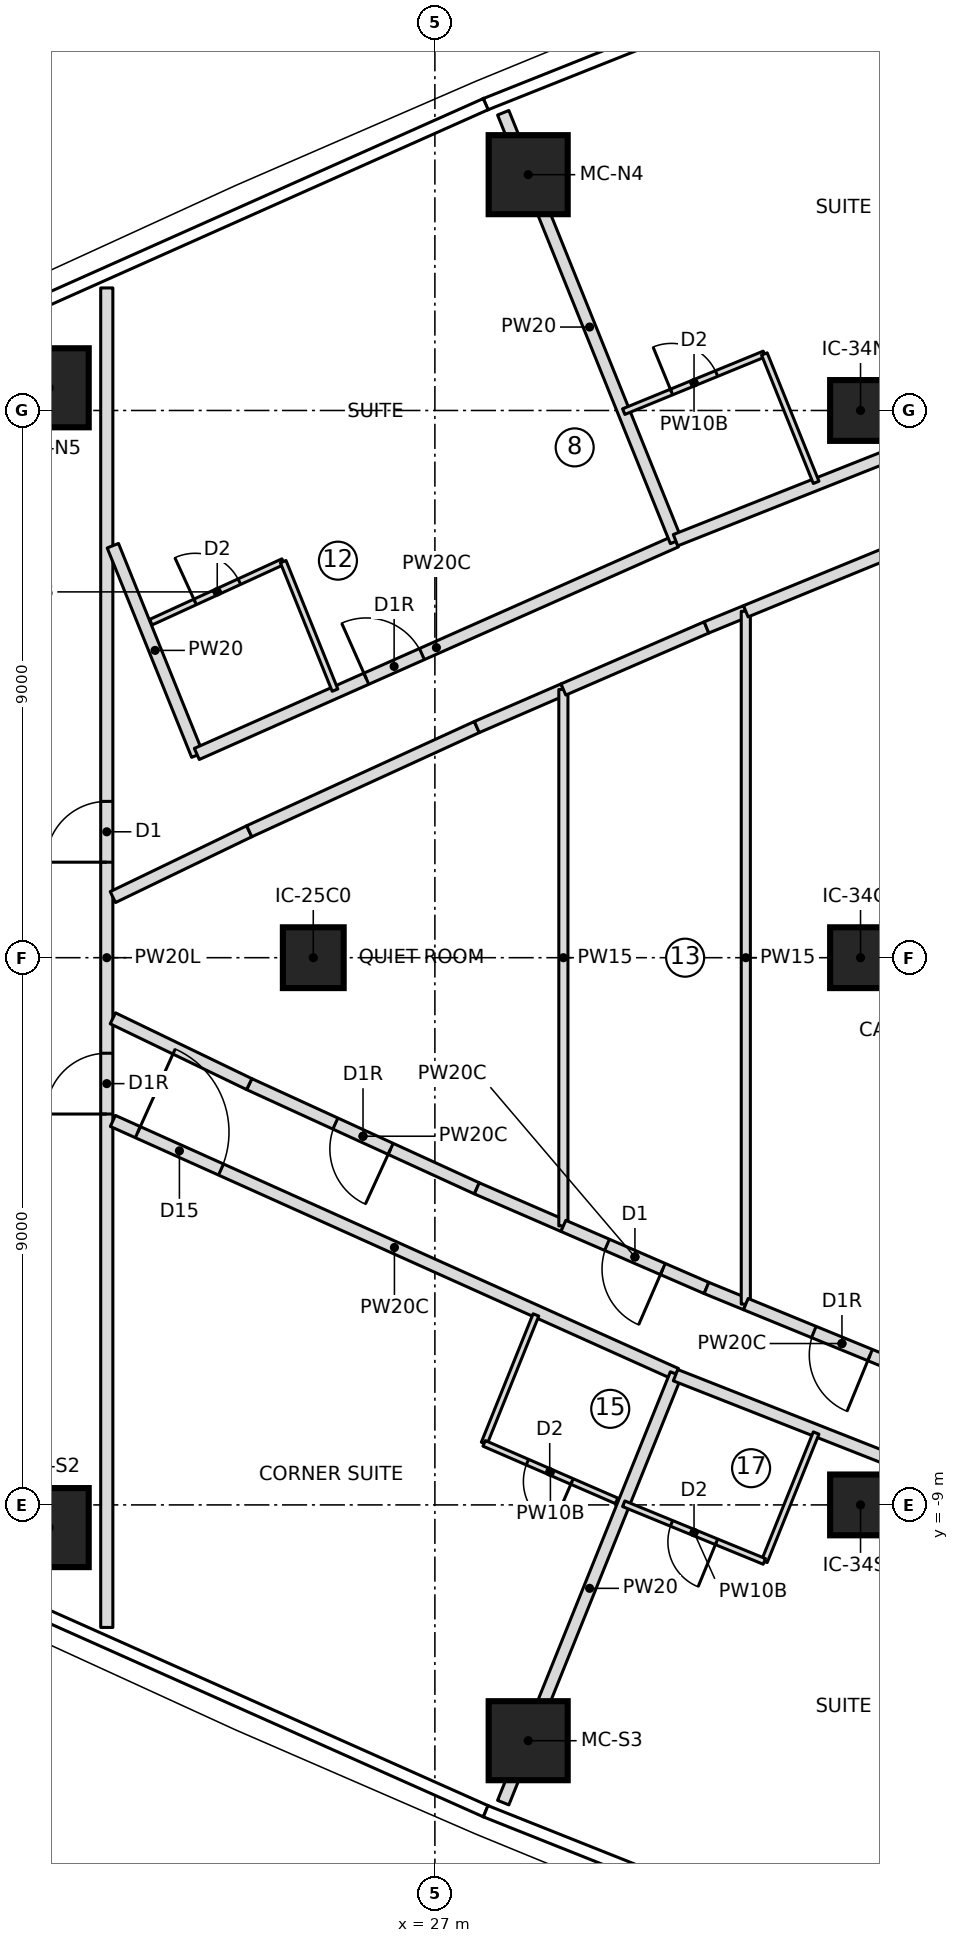
"""IFC4 building model, lengths in metres.
Left out: names, types, materials, properties, quantities, classifications, styles, units other than length and angle.
Written with IfcOpenShell. Run it as: python <this file> out.ifc"""

import sys

from ifc_helpers import new_model, si_unit, direction, frame, frame_2d, origin, origin_2d, place, context, subcontext, project, spatial, rectangle, extrude, element, fill, save


model = new_model("IFC4")
c1 = context("Model", 3, precision=1e-05, world=origin(), true_north=direction((0.0, 1.0)))
c2 = subcontext(c1, "Body", "Model", "MODEL_VIEW")
j1 = project(units=[si_unit("LENGTHUNIT", "METRE"), si_unit("PLANEANGLEUNIT", "RADIAN")], contexts=[c1])
p1 = place(None, origin())
s1 = spatial("IfcSite", under=j1, at=p1, CompositionType="ELEMENT")
p2 = place(p1, origin())
s2 = spatial("IfcBuilding", under=s1, at=p2, CompositionType="ELEMENT")
p3 = place(p2, frame((0.0, 0.0, 179.05)))
s3 = spatial("IfcBuildingStorey", under=s2, at=p3, CompositionType="ELEMENT", Elevation=179.05)
for number, where, z_axis, x_axis in (
    (1, (20.657, -9.373, 0.0), (0.0, 0.0, 1.0), (1.0, 0.0, 0.0)),
    (2, (28.534, -12.878, 0.0), (0.0, 0.0, 1.0), (1.0, 0.0, 0.0)),
    (3, (28.534, 12.878, 0.0), (0.0, 0.0, 1.0), (1.0, 0.0, 0.0)),
    (4, (20.657, 9.373, 0.0), (0.0, 0.0, 1.0), (1.0, 0.0, 0.0)),
):
    element("IfcColumn", number, at=place(p3, frame(where, z_axis=z_axis, x_axis=x_axis)), inside=s3, PredefinedType="COLUMN", context=c2, shape_type="SweptSolid", body=[
        extrude(rectangle(XDim=1.3, YDim=1.3, at=origin_2d()), origin(), (0.0, 0.0, 1.0), 3.55),
    ])
for number, where, z_axis, x_axis in (
    (5, (25.0, 0.0, 0.0), (0.0, 0.0, 1.0), (1.0, 0.0, 0.0)),
    (6, (34.0, -9.0, 0.0), (0.0, 0.0, 1.0), (1.0, 0.0, 0.0)),
    (7, (34.0, 0.0, 0.0), (0.0, 0.0, 1.0), (1.0, 0.0, 0.0)),
    (8, (34.0, 9.0, 0.0), (0.0, 0.0, 1.0), (1.0, 0.0, 0.0)),
):
    element("IfcColumn", number, at=place(p3, frame(where, z_axis=z_axis, x_axis=x_axis)), inside=s3, PredefinedType="COLUMN", context=c2, shape_type="SweptSolid", body=[
        extrude(rectangle(XDim=1.0, YDim=1.0, at=origin_2d()), origin(), (0.0, 0.0, 1.0), 3.55),
    ])
p4 = place(p3, frame((21.604, -11.015, 0.0), z_axis=(0.0, 0.0, 1.0), x_axis=(0.0, 1.0, 0.0)))
e9 = element("IfcWall", 9, at=p4, inside=s3, PredefinedType="PARTITIONING", context=c2, shape_type="SweptSolid", body=[
    extrude(rectangle(XDim=22.031, YDim=0.2, at=frame_2d((11.015, 0.0))), origin(), (0.0, 0.0, 1.0), 3.25),
])
p5 = place(p4, frame((12.586, 0.0, 0.0)))
e10 = element("IfcOpeningElement", 10, at=p5, cuts=e9, PredefinedType="OPENING", context=c2, shape_type="SweptSolid", body=[
    extrude(rectangle(XDim=1.0, YDim=2.1, at=frame_2d((0.5, 1.05))), frame((0.0, 0.11, 0.0), z_axis=(0.0, -1.0, 0.0), x_axis=(1.0, 0.0, 0.0)), (0.0, 0.0, 1.0), 0.22),
])
p6 = place(p4, frame((8.444, 0.0, 0.0)))
e11 = element("IfcOpeningElement", 11, at=p6, cuts=e9, PredefinedType="OPENING", context=c2, shape_type="SweptSolid", body=[
    extrude(rectangle(XDim=1.0, YDim=2.1, at=frame_2d((0.5, 1.05))), frame((0.0, 0.11, 0.0), z_axis=(0.0, -1.0, 0.0), x_axis=(1.0, 0.0, 0.0)), (0.0, 0.0, 1.0), 0.22),
])
p7 = place(p3, frame((23.092, 3.333, 0.0), z_axis=(0.0, 0.0, 1.0), x_axis=(-0.373883495288, 0.927475677283, 0.0)))
e12 = element("IfcWall", 12, at=p7, inside=s3, PredefinedType="PARTITIONING", context=c2, shape_type="SweptSolid", body=[
    extrude(rectangle(XDim=3.713, YDim=0.2, at=frame_2d((1.856, 0.0))), origin(), (0.0, 0.0, 1.0), 3.25),
])
p8 = place(p3, frame((23.085, 3.351, 0.0), z_axis=(0.0, 0.0, 1.0), x_axis=(0.914065936171, 0.405565610392, 0.0)))
e13 = element("IfcWall", 13, at=p8, inside=s3, PredefinedType="PARTITIONING", context=c2, shape_type="SweptSolid", body=[
    extrude(rectangle(XDim=8.622, YDim=0.2, at=frame_2d((4.311, 0.0))), origin(), (0.0, 0.0, 1.0), 3.25),
])
p9 = place(p8, frame((3.05, 0.0, 0.0)))
e14 = element("IfcOpeningElement", 14, at=p9, cuts=e13, PredefinedType="OPENING", context=c2, shape_type="SweptSolid", body=[
    extrude(rectangle(XDim=1.0, YDim=2.1, at=frame_2d((0.5, 1.05))), frame((0.0, 0.11, 0.0), z_axis=(0.0, -1.0, 0.0), x_axis=(1.0, 0.0, 0.0)), (0.0, 0.0, 1.0), 0.22),
])
p10 = place(p3, frame((22.33, 5.518, 0.0), z_axis=(0.0, 0.0, 1.0), x_axis=(0.909209708064, 0.416338452178, 0.0)))
e15 = element("IfcWall", 15, at=p10, inside=s3, PredefinedType="PARTITIONING", context=c2, shape_type="SweptSolid", body=[
    extrude(rectangle(XDim=2.393, YDim=0.1, at=frame_2d((1.196, 0.0))), origin(), (0.0, 0.0, 1.0), 3.25),
])
p11 = place(p10, frame((0.8, 0.0, 0.0)))
e16 = element("IfcOpeningElement", 16, at=p11, cuts=e15, PredefinedType="OPENING", context=c2, shape_type="SweptSolid", body=[
    extrude(rectangle(XDim=0.8, YDim=2.1, at=frame_2d((0.4, 1.05))), frame((0.0, 0.06, 0.0), z_axis=(0.0, -1.0, 0.0), x_axis=(1.0, 0.0, 0.0)), (0.0, 0.0, 1.0), 0.12),
])
p12 = place(p3, frame((24.505, 6.514, 0.0), z_axis=(0.0, 0.0, 1.0), x_axis=(0.373919298041, -0.927461243693, 0.0)))
e17 = element("IfcWall", 17, at=p12, inside=s3, PredefinedType="PARTITIONING", context=c2, shape_type="SweptSolid", body=[
    extrude(rectangle(XDim=2.279, YDim=0.1, at=frame_2d((1.14, 0.0))), origin(), (0.0, 0.0, 1.0), 3.25),
])
p13 = place(p3, frame((30.965, 6.848, 0.0), z_axis=(0.0, 0.0, 1.0), x_axis=(-0.373876084216, 0.927478664796, 0.0)))
e18 = element("IfcWall", 18, at=p13, inside=s3, PredefinedType="PARTITIONING", context=c2, shape_type="SweptSolid", body=[
    extrude(rectangle(XDim=7.6, YDim=0.2, at=frame_2d((3.8, 0.0))), origin(), (0.0, 0.0, 1.0), 3.25),
])
p14 = place(p3, frame((38.972, 10.045, 0.0), z_axis=(0.0, 0.0, 1.0), x_axis=(-0.929554647243, -0.368684360651, 0.0)))
e19 = element("IfcWall", 19, at=p14, inside=s3, PredefinedType="PARTITIONING", context=c2, shape_type="SweptSolid", body=[
    extrude(rectangle(XDim=8.622, YDim=0.2, at=frame_2d((4.311, 0.0))), origin(), (0.0, 0.0, 1.0), 3.25),
])
p15 = place(p14, frame((0.35, 0.0, 0.0)))
e20 = element("IfcOpeningElement", 20, at=p15, cuts=e19, PredefinedType="OPENING", context=c2, shape_type="SweptSolid", body=[
    extrude(rectangle(XDim=1.0, YDim=2.1, at=frame_2d((0.5, 1.05))), frame((0.0, 0.11, 0.0), z_axis=(0.0, -1.0, 0.0), x_axis=(1.0, 0.0, 0.0)), (0.0, 0.0, 1.0), 0.22),
])
p16 = place(p3, frame((30.105, 8.981, 0.0), z_axis=(0.0, 0.0, 1.0), x_axis=(0.92519499486, 0.379492057212, 0.0)))
e21 = element("IfcWall", 21, at=p16, inside=s3, PredefinedType="PARTITIONING", context=c2, shape_type="SweptSolid", body=[
    extrude(rectangle(XDim=2.5, YDim=0.1, at=frame_2d((1.25, 0.0))), origin(), (0.0, 0.0, 1.0), 3.25),
])
p17 = place(p16, frame((0.85, 0.0, 0.0)))
e22 = element("IfcOpeningElement", 22, at=p17, cuts=e21, PredefinedType="OPENING", context=c2, shape_type="SweptSolid", body=[
    extrude(rectangle(XDim=0.8, YDim=2.1, at=frame_2d((0.4, 1.05))), frame((0.0, 0.06, 0.0), z_axis=(0.0, -1.0, 0.0), x_axis=(1.0, 0.0, 0.0)), (0.0, 0.0, 1.0), 0.12),
])
p18 = place(p3, frame((32.418, 9.93, 0.0), z_axis=(0.0, 0.0, 1.0), x_axis=(0.373847853912, -0.927490044219, 0.0)))
e23 = element("IfcWall", 23, at=p18, inside=s3, PredefinedType="PARTITIONING", context=c2, shape_type="SweptSolid", body=[
    extrude(rectangle(XDim=2.277, YDim=0.1, at=frame_2d((1.139, 0.0))), origin(), (0.0, 0.0, 1.0), 3.25),
])
p19 = place(p3, frame((21.704, -2.685, 0.0), z_axis=(0.0, 0.0, 1.0), x_axis=(0.912095082087, -0.409978732659, 0.0)))
e24 = element("IfcWall", 24, at=p19, inside=s3, PredefinedType="PARTITIONING", context=c2, shape_type="SweptSolid", body=[
    extrude(rectangle(XDim=10.154, YDim=0.2, at=frame_2d((5.077, 0.0))), origin(), (0.0, 0.0, 1.0), 3.25),
])
p20 = place(p19, frame((0.45, 0.0, 0.0)))
e25 = element("IfcOpeningElement", 25, at=p20, cuts=e24, PredefinedType="OPENING", context=c2, shape_type="SweptSolid", body=[
    extrude(rectangle(XDim=1.5, YDim=2.1, at=frame_2d((0.75, 1.05))), frame((0.0, 0.11, 0.0), z_axis=(0.0, -1.0, 0.0), x_axis=(1.0, 0.0, 0.0)), (0.0, 0.0, 1.0), 0.22),
])
p21 = place(p3, frame((27.81, -7.988, 0.0), z_axis=(0.0, 0.0, 1.0), x_axis=(0.373865727953, 0.927482839443, 0.0)))
e26 = element("IfcWall", 26, at=p21, inside=s3, PredefinedType="PARTITIONING", context=c2, shape_type="SweptSolid", body=[
    extrude(rectangle(XDim=2.278, YDim=0.1, at=frame_2d((1.139, 0.0))), origin(), (0.0, 0.0, 1.0), 3.25),
])
p22 = place(p3, frame((29.989, -8.933, 0.0), z_axis=(0.0, 0.0, 1.0), x_axis=(-0.917386792713, 0.397996824805, 0.0)))
e27 = element("IfcWall", 27, at=p22, inside=s3, PredefinedType="PARTITIONING", context=c2, shape_type="SweptSolid", body=[
    extrude(rectangle(XDim=2.375, YDim=0.1, at=frame_2d((1.188, 0.0))), origin(), (0.0, 0.0, 1.0), 3.25),
])
p23 = place(p22, frame((0.8, 0.0, 0.0)))
e28 = element("IfcOpeningElement", 28, at=p23, cuts=e27, PredefinedType="OPENING", context=c2, shape_type="SweptSolid", body=[
    extrude(rectangle(XDim=0.8, YDim=2.1, at=frame_2d((0.4, 1.05))), frame((0.0, 0.06, 0.0), z_axis=(0.0, -1.0, 0.0), x_axis=(1.0, 0.0, 0.0)), (0.0, 0.0, 1.0), 0.12),
])
p24 = place(p3, frame((28.124, -13.897, 0.0), z_axis=(0.0, 0.0, 1.0), x_axis=(0.373876084216, 0.927478664796, 0.0)))
e29 = element("IfcWall", 29, at=p24, inside=s3, PredefinedType="PARTITIONING", context=c2, shape_type="SweptSolid", body=[
    extrude(rectangle(XDim=7.6, YDim=0.2, at=frame_2d((3.8, 0.0))), origin(), (0.0, 0.0, 1.0), 3.25),
])
p25 = place(p3, frame((30.958, -6.866, 0.0), z_axis=(0.0, 0.0, 1.0), x_axis=(0.93040517394, -0.366532689274, 0.0)))
e30 = element("IfcWall", 30, at=p25, inside=s3, PredefinedType="PARTITIONING", context=c2, shape_type="SweptSolid", body=[
    extrude(rectangle(XDim=8.622, YDim=0.2, at=frame_2d((4.311, 0.0))), origin(), (0.0, 0.0, 1.0), 3.25),
])
p26 = place(p25, frame((4.25, 0.0, 0.0)))
e31 = element("IfcOpeningElement", 31, at=p26, cuts=e30, PredefinedType="OPENING", context=c2, shape_type="SweptSolid", body=[
    extrude(rectangle(XDim=1.0, YDim=2.1, at=frame_2d((0.5, 1.05))), frame((0.0, 0.11, 0.0), z_axis=(0.0, -1.0, 0.0), x_axis=(1.0, 0.0, 0.0)), (0.0, 0.0, 1.0), 0.22),
])
p27 = place(p3, frame((33.27, -7.818, 0.0), z_axis=(0.0, 0.0, 1.0), x_axis=(-0.373847853912, -0.927490044219, 0.0)))
e32 = element("IfcWall", 32, at=p27, inside=s3, PredefinedType="PARTITIONING", context=c2, shape_type="SweptSolid", body=[
    extrude(rectangle(XDim=2.277, YDim=0.1, at=frame_2d((1.139, 0.0))), origin(), (0.0, 0.0, 1.0), 3.25),
])
p28 = place(p3, frame((32.418, -9.93, 0.0), z_axis=(0.0, 0.0, 1.0), x_axis=(-0.92519499486, 0.379492057212, 0.0)))
e33 = element("IfcWall", 33, at=p28, inside=s3, PredefinedType="PARTITIONING", context=c2, shape_type="SweptSolid", body=[
    extrude(rectangle(XDim=2.5, YDim=0.1, at=frame_2d((1.25, 0.0))), origin(), (0.0, 0.0, 1.0), 3.25),
])
p29 = place(p28, frame((0.85, 0.0, 0.0)))
e34 = element("IfcOpeningElement", 34, at=p29, cuts=e33, PredefinedType="OPENING", context=c2, shape_type="SweptSolid", body=[
    extrude(rectangle(XDim=0.8, YDim=2.1, at=frame_2d((0.4, 1.05))), frame((0.0, 0.06, 0.0), z_axis=(0.0, -1.0, 0.0), x_axis=(1.0, 0.0, 0.0)), (0.0, 0.0, 1.0), 0.12),
])
p30 = place(p3, frame((27.69, -3.793, 0.0), z_axis=(0.0, 0.0, 1.0), x_axis=(-0.909180834404, 0.416401501382, 0.0)))
e35 = element("IfcWall", 35, at=p30, inside=s3, PredefinedType="PARTITIONING", context=c2, shape_type="SweptSolid", body=[
    extrude(rectangle(XDim=4.117, YDim=0.2, at=frame_2d((2.059, 0.0))), origin(), (0.0, 0.0, 1.0), 3.25),
])
p31 = place(p30, frame((1.559, 0.0, 0.0)))
e36 = element("IfcOpeningElement", 36, at=p31, cuts=e35, PredefinedType="OPENING", context=c2, shape_type="SweptSolid", body=[
    extrude(rectangle(XDim=1.0, YDim=2.1, at=frame_2d((0.5, 1.05))), frame((0.0, 0.11, 0.0), z_axis=(0.0, -1.0, 0.0), x_axis=(1.0, 0.0, 0.0)), (0.0, 0.0, 1.0), 0.22),
])
for number, where, z_axis, x_axis in (
    (37, (23.947, -2.079, 0.0), (0.0, 0.0, 1.0), (-0.901, 0.435, 0.0)),
    (38, (21.704, 0.997, 0.0), (0.0, 0.0, 1.0), (0.901, 0.435, 0.0)),
):
    element("IfcWall", number, at=place(p3, frame(where, z_axis=z_axis, x_axis=x_axis)), inside=s3, PredefinedType="PARTITIONING", context=c2, shape_type="SweptSolid", body=[
        extrude(rectangle(XDim=2.49, YDim=0.2, at=frame_2d((1.245, 0.0))), origin(), (0.0, 0.0, 1.0), 3.25),
    ])
p32 = place(p3, frame((23.947, 2.079, 0.0), z_axis=(0.0, 0.0, 1.0), x_axis=(0.909180834404, 0.416401501382, 0.0)))
e39 = element("IfcWall", 39, at=p32, inside=s3, PredefinedType="PARTITIONING", context=c2, shape_type="SweptSolid", body=[
    extrude(rectangle(XDim=4.117, YDim=0.2, at=frame_2d((2.059, 0.0))), origin(), (0.0, 0.0, 1.0), 3.25),
])
for number, where, z_axis, x_axis in (
    (40, (27.69, 3.793, 0.0), (0.0, 0.0, 1.0), (0.917, 0.398, 0.0)),
    (41, (29.113, -4.411, 0.0), (0.0, 0.0, 1.0), (-0.917, 0.398, 0.0)),
):
    element("IfcWall", number, at=place(p3, frame(where, z_axis=z_axis, x_axis=x_axis)), inside=s3, PredefinedType="PARTITIONING", context=c2, shape_type="SweptSolid", body=[
        extrude(rectangle(XDim=1.552, YDim=0.2, at=frame_2d((0.776, 0.0))), origin(), (0.0, 0.0, 1.0), 3.25),
    ])
p33 = place(p3, frame((29.113, -4.411, 0.0), z_axis=(0.0, 0.0, 1.0), x_axis=(0.0, 1.0, 0.0)))
e42 = element("IfcWall", 42, at=p33, inside=s3, PredefinedType="PARTITIONING", context=c2, shape_type="SweptSolid", body=[
    extrude(rectangle(XDim=8.822, YDim=0.15, at=frame_2d((4.411, 0.0))), origin(), (0.0, 0.0, 1.0), 3.25),
])
p34 = place(p3, frame((31.467, -5.432, 0.0), z_axis=(0.0, 0.0, 1.0), x_axis=(-0.91737845263, 0.398016048231, 0.0)))
e43 = element("IfcWall", 43, at=p34, inside=s3, PredefinedType="PARTITIONING", context=c2, shape_type="SweptSolid", body=[
    extrude(rectangle(XDim=2.565, YDim=0.2, at=frame_2d((1.283, 0.0))), origin(), (0.0, 0.0, 1.0), 3.25),
])
p35 = place(p34, frame((0.783, 0.0, 0.0)))
e44 = element("IfcOpeningElement", 44, at=p35, cuts=e43, PredefinedType="OPENING", context=c2, shape_type="SweptSolid", body=[
    extrude(rectangle(XDim=1.0, YDim=2.1, at=frame_2d((0.5, 1.05))), frame((0.0, 0.11, 0.0), z_axis=(0.0, -1.0, 0.0), x_axis=(1.0, 0.0, 0.0)), (0.0, 0.0, 1.0), 0.22),
])
p36 = place(p3, frame((32.113, -5.697, 0.0), z_axis=(0.0, 0.0, 1.0), x_axis=(-0.92526293873, 0.379326368992, 0.0)))
e45 = element("IfcWall", 45, at=p36, inside=s3, PredefinedType="PARTITIONING", context=c2, shape_type="SweptSolid", body=[
    extrude(rectangle(XDim=0.699, YDim=0.2, at=frame_2d((0.35, 0.0))), origin(), (0.0, 0.0, 1.0), 3.25),
])
p37 = place(p3, frame((29.113, 4.411, 0.0), z_axis=(0.0, 0.0, 1.0), x_axis=(0.91737845263, 0.398016048231, 0.0)))
e46 = element("IfcWall", 46, at=p37, inside=s3, PredefinedType="PARTITIONING", context=c2, shape_type="SweptSolid", body=[
    extrude(rectangle(XDim=2.565, YDim=0.2, at=frame_2d((1.283, 0.0))), origin(), (0.0, 0.0, 1.0), 3.25),
])
p38 = place(p3, frame((31.467, 5.432, 0.0), z_axis=(0.0, 0.0, 1.0), x_axis=(0.92526293873, 0.379326368992, 0.0)))
e47 = element("IfcWall", 47, at=p38, inside=s3, PredefinedType="PARTITIONING", context=c2, shape_type="SweptSolid", body=[
    extrude(rectangle(XDim=0.699, YDim=0.2, at=frame_2d((0.35, 0.0))), origin(), (0.0, 0.0, 1.0), 3.25),
])
p39 = place(p3, frame((32.113, -5.697, 0.0), z_axis=(0.0, 0.0, 1.0), x_axis=(0.0, 1.0, 0.0)))
e48 = element("IfcWall", 48, at=p39, inside=s3, PredefinedType="PARTITIONING", context=c2, shape_type="SweptSolid", body=[
    extrude(rectangle(XDim=11.395, YDim=0.15, at=frame_2d((5.697, 0.0))), origin(), (0.0, 0.0, 1.0), 3.25),
])
p40 = place(p3, frame((35.276, -6.994, 0.0), z_axis=(0.0, 0.0, 1.0), x_axis=(-0.925194984271, 0.379492083026, 0.0)))
e49 = element("IfcWall", 49, at=p40, inside=s3, PredefinedType="PARTITIONING", context=c2, shape_type="SweptSolid", body=[
    extrude(rectangle(XDim=3.418, YDim=0.2, at=frame_2d((1.709, 0.0))), origin(), (0.0, 0.0, 1.0), 3.25),
])
p41 = place(p40, frame((1.209, 0.0, 0.0)))
e50 = element("IfcOpeningElement", 50, at=p41, cuts=e49, PredefinedType="OPENING", context=c2, shape_type="SweptSolid", body=[
    extrude(rectangle(XDim=1.0, YDim=2.1, at=frame_2d((0.5, 1.05))), frame((0.0, 0.11, 0.0), z_axis=(0.0, -1.0, 0.0), x_axis=(1.0, 0.0, 0.0)), (0.0, 0.0, 1.0), 0.22),
])
p42 = place(p3, frame((32.113, 5.697, 0.0), z_axis=(0.0, 0.0, 1.0), x_axis=(0.925194984271, 0.379492083026, 0.0)))
e51 = element("IfcWall", 51, at=p42, inside=s3, PredefinedType="PARTITIONING", context=c2, shape_type="SweptSolid", body=[
    extrude(rectangle(XDim=3.418, YDim=0.2, at=frame_2d((1.709, 0.0))), origin(), (0.0, 0.0, 1.0), 3.25),
])
p43 = place(p5, origin())
e52 = element("IfcDoor", 52, at=p43, inside=s3, OperationType="SINGLE_SWING_LEFT", PredefinedType="DOOR", context=c2, shape_type="SweptSolid", body=[
    extrude(rectangle(XDim=1.0, YDim=2.1, at=frame_2d((0.5, 1.05))), frame((0.0, 0.025, 0.0), z_axis=(0.0, -1.0, 0.0), x_axis=(1.0, 0.0, 0.0)), (0.0, 0.0, 1.0), 0.05),
])
fill(e10, e52)
p44 = place(p6, origin())
e53 = element("IfcDoor", 53, at=p44, inside=s3, OperationType="SINGLE_SWING_RIGHT", PredefinedType="DOOR", context=c2, shape_type="SweptSolid", body=[
    extrude(rectangle(XDim=1.0, YDim=2.1, at=frame_2d((0.5, 1.05))), frame((0.0, 0.025, 0.0), z_axis=(0.0, -1.0, 0.0), x_axis=(1.0, 0.0, 0.0)), (0.0, 0.0, 1.0), 0.05),
])
fill(e11, e53)
p45 = place(p11, origin())
e54 = element("IfcDoor", 54, at=p45, inside=s3, OperationType="SINGLE_SWING_LEFT", PredefinedType="DOOR", context=c2, shape_type="SweptSolid", body=[
    extrude(rectangle(XDim=0.8, YDim=2.1, at=frame_2d((0.4, 1.05))), frame((0.0, 0.025, 0.0), z_axis=(0.0, -1.0, 0.0), x_axis=(1.0, 0.0, 0.0)), (0.0, 0.0, 1.0), 0.05),
])
fill(e16, e54)
p46 = place(p9, origin())
e55 = element("IfcDoor", 55, at=p46, inside=s3, OperationType="SINGLE_SWING_RIGHT", PredefinedType="DOOR", context=c2, shape_type="SweptSolid", body=[
    extrude(rectangle(XDim=1.0, YDim=2.1, at=frame_2d((0.5, 1.05))), frame((0.0, 0.025, 0.0), z_axis=(0.0, -1.0, 0.0), x_axis=(1.0, 0.0, 0.0)), (0.0, 0.0, 1.0), 0.05),
])
fill(e14, e55)
p47 = place(p17, origin())
e56 = element("IfcDoor", 56, at=p47, inside=s3, OperationType="SINGLE_SWING_LEFT", PredefinedType="DOOR", context=c2, shape_type="SweptSolid", body=[
    extrude(rectangle(XDim=0.8, YDim=2.1, at=frame_2d((0.4, 1.05))), frame((0.0, 0.025, 0.0), z_axis=(0.0, -1.0, 0.0), x_axis=(1.0, 0.0, 0.0)), (0.0, 0.0, 1.0), 0.05),
])
fill(e22, e56)
p48 = place(p23, origin())
e57 = element("IfcDoor", 57, at=p48, inside=s3, OperationType="SINGLE_SWING_LEFT", PredefinedType="DOOR", context=c2, shape_type="SweptSolid", body=[
    extrude(rectangle(XDim=0.8, YDim=2.1, at=frame_2d((0.4, 1.05))), frame((0.0, 0.025, 0.0), z_axis=(0.0, -1.0, 0.0), x_axis=(1.0, 0.0, 0.0)), (0.0, 0.0, 1.0), 0.05),
])
fill(e28, e57)
p49 = place(p20, origin())
e58 = element("IfcDoor", 58, at=p49, inside=s3, OperationType="DOUBLE_DOOR_SINGLE_SWING", PredefinedType="DOOR", context=c2, shape_type="SweptSolid", body=[
    extrude(rectangle(XDim=1.5, YDim=2.1, at=frame_2d((0.75, 1.05))), frame((0.0, 0.025, 0.0), z_axis=(0.0, -1.0, 0.0), x_axis=(1.0, 0.0, 0.0)), (0.0, 0.0, 1.0), 0.05),
])
fill(e25, e58)
p50 = place(p29, origin())
e59 = element("IfcDoor", 59, at=p50, inside=s3, OperationType="SINGLE_SWING_LEFT", PredefinedType="DOOR", context=c2, shape_type="SweptSolid", body=[
    extrude(rectangle(XDim=0.8, YDim=2.1, at=frame_2d((0.4, 1.05))), frame((0.0, 0.025, 0.0), z_axis=(0.0, -1.0, 0.0), x_axis=(1.0, 0.0, 0.0)), (0.0, 0.0, 1.0), 0.05),
])
fill(e34, e59)
p51 = place(p31, origin())
e60 = element("IfcDoor", 60, at=p51, inside=s3, OperationType="SINGLE_SWING_RIGHT", PredefinedType="DOOR", context=c2, shape_type="SweptSolid", body=[
    extrude(rectangle(XDim=1.0, YDim=2.1, at=frame_2d((0.5, 1.05))), frame((0.0, 0.025, 0.0), z_axis=(0.0, -1.0, 0.0), x_axis=(1.0, 0.0, 0.0)), (0.0, 0.0, 1.0), 0.05),
])
fill(e36, e60)
p52 = place(p35, origin())
e61 = element("IfcDoor", 61, at=p52, inside=s3, OperationType="SINGLE_SWING_LEFT", PredefinedType="DOOR", context=c2, shape_type="SweptSolid", body=[
    extrude(rectangle(XDim=1.0, YDim=2.1, at=frame_2d((0.5, 1.05))), frame((0.0, 0.025, 0.0), z_axis=(0.0, -1.0, 0.0), x_axis=(1.0, 0.0, 0.0)), (0.0, 0.0, 1.0), 0.05),
])
fill(e44, e61)
p53 = place(p41, origin())
e62 = element("IfcDoor", 62, at=p53, inside=s3, OperationType="SINGLE_SWING_RIGHT", PredefinedType="DOOR", context=c2, shape_type="SweptSolid", body=[
    extrude(rectangle(XDim=1.0, YDim=2.1, at=frame_2d((0.5, 1.05))), frame((0.0, 0.025, 0.0), z_axis=(0.0, -1.0, 0.0), x_axis=(1.0, 0.0, 0.0)), (0.0, 0.0, 1.0), 0.05),
])
fill(e50, e62)
save(model, sys.argv[1])
